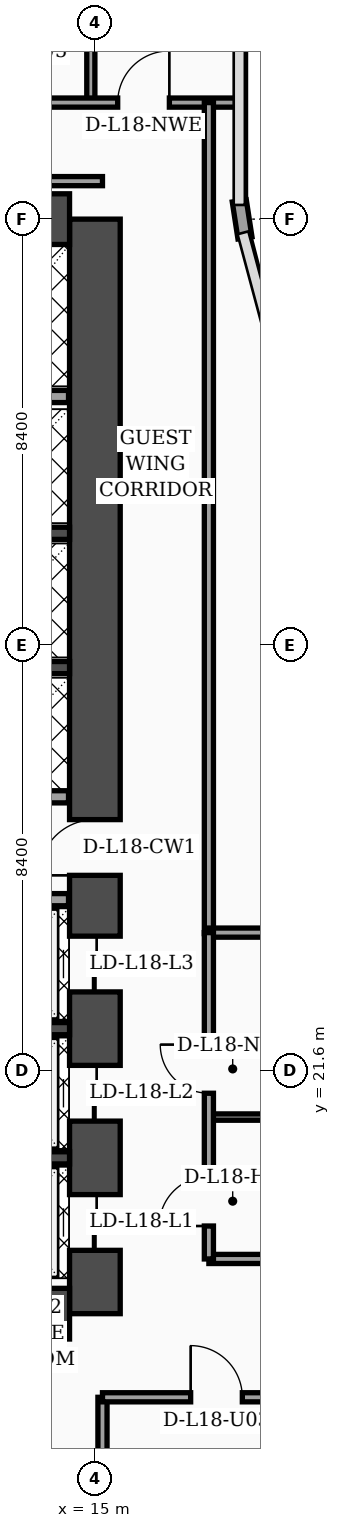
"""IFC4 building model, lengths in metres.
Left out: names, types, materials, properties, quantities, classifications, styles, units other than length and angle.
Written with IfcOpenShell. Run it as: python <this file> out.ifc"""

import sys

from ifc_helpers import new_model, si_unit, direction, frame, frame_2d, origin, place, context, subcontext, project, spatial, rectangle, extrude, element, fill, save


model = new_model("IFC4")
c1 = context("Model", 3, precision=1e-05, world=origin(), true_north=direction((0.0, 1.0)))
c2 = subcontext(c1, "Body", "Model", "MODEL_VIEW")
j1 = project(units=[si_unit("LENGTHUNIT", "METRE"), si_unit("PLANEANGLEUNIT", "RADIAN")], contexts=[c1])
p1 = place(None, origin())
s1 = spatial("IfcSite", under=j1, at=p1, CompositionType="ELEMENT")
p2 = place(p1, origin())
s2 = spatial("IfcBuilding", under=s1, at=p2, CompositionType="ELEMENT")
p3 = place(p2, frame((0.0, 0.0, 77.4)))
s3 = spatial("IfcBuildingStorey", under=s2, at=p3, CompositionType="ELEMENT", Elevation=77.4)
p4 = place(p3, frame((15.0, 16.8, 0.0), z_axis=(0.0, 0.0, 1.0), x_axis=(0.0, 1.0, 0.0)))
e1 = element("IfcWall", 1, at=p4, inside=s3, PredefinedType="SHEAR", context=c2, shape_type="SweptSolid", body=[
    extrude(rectangle(XDim=21.6, YDim=1.0, at=frame_2d((10.8, 0.0))), origin(), (0.0, 0.0, 1.0), 3.56),
])
p5 = place(p4, frame((8.65, 0.0, 0.0)))
e2 = element("IfcOpeningElement", 2, at=p5, cuts=e1, PredefinedType="OPENING", context=c2, shape_type="SweptSolid", body=[
    extrude(rectangle(XDim=1.1, YDim=2.2, at=frame_2d((0.55, 1.1))), frame((0.0, 0.51, 0.0), z_axis=(0.0, -1.0, 0.0), x_axis=(1.0, 0.0, 0.0)), (0.0, 0.0, 1.0), 1.02),
])
p6 = place(p4, frame((1.25, 0.0, 0.0)))
e3 = element("IfcOpeningElement", 3, at=p6, cuts=e1, PredefinedType="OPENING", context=c2, shape_type="SweptSolid", body=[
    extrude(rectangle(XDim=1.1, YDim=2.2, at=frame_2d((0.55, 1.1))), frame((0.0, 0.51, 0.0), z_axis=(0.0, -1.0, 0.0), x_axis=(1.0, 0.0, 0.0)), (0.0, 0.0, 1.0), 1.02),
])
p7 = place(p4, frame((3.8, 0.0, 0.0)))
e4 = element("IfcOpeningElement", 4, at=p7, cuts=e1, PredefinedType="OPENING", context=c2, shape_type="SweptSolid", body=[
    extrude(rectangle(XDim=1.1, YDim=2.2, at=frame_2d((0.55, 1.1))), frame((0.0, 0.51, 0.0), z_axis=(0.0, -1.0, 0.0), x_axis=(1.0, 0.0, 0.0)), (0.0, 0.0, 1.0), 1.02),
])
p8 = place(p4, frame((6.35, 0.0, 0.0)))
e5 = element("IfcOpeningElement", 5, at=p8, cuts=e1, PredefinedType="OPENING", context=c2, shape_type="SweptSolid", body=[
    extrude(rectangle(XDim=1.1, YDim=2.2, at=frame_2d((0.55, 1.1))), frame((0.0, 0.51, 0.0), z_axis=(0.0, -1.0, 0.0), x_axis=(1.0, 0.0, 0.0)), (0.0, 0.0, 1.0), 1.02),
])
for number, where, z_axis, x_axis in (
    (6, (4.7, 38.4, 0.0), (0.0, 0.0, 1.0), (1.0, 0.0, 0.0)),
    (7, (4.7, 16.8, 0.0), (0.0, 0.0, 1.0), (1.0, 0.0, 0.0)),
):
    element("IfcWall", number, at=place(p3, frame(where, z_axis=z_axis, x_axis=x_axis)), inside=s3, PredefinedType="SHEAR", context=c2, shape_type="SweptSolid", body=[
        extrude(rectangle(XDim=9.8, YDim=1.0, at=frame_2d((4.9, 0.0))), origin(), (0.0, 0.0, 1.0), 3.56),
    ])
for number, where, z_axis, x_axis in (
    (8, (12.18, 19.875, 0.0), (0.0, 0.0, 1.0), (1.0, 0.0, 0.0)),
    (9, (12.18, 22.425, 0.0), (0.0, 0.0, 1.0), (1.0, 0.0, 0.0)),
    (10, (12.18, 29.55, 0.0), (0.0, 0.0, 1.0), (1.0, 0.0, 0.0)),
    (11, (12.18, 32.2, 0.0), (0.0, 0.0, 1.0), (1.0, 0.0, 0.0)),
):
    element("IfcWall", number, at=place(p3, frame(where, z_axis=z_axis, x_axis=x_axis)), inside=s3, PredefinedType="SOLIDWALL", context=c2, shape_type="SweptSolid", body=[
        extrude(rectangle(XDim=2.32, YDim=0.24, at=frame_2d((1.16, 0.0))), origin(), (0.0, 0.0, 1.0), 3.56),
    ])
p9 = place(p3, frame((17.962, 38.03, 0.0), z_axis=(0.0, 0.0, 1.0), x_axis=(-0.15141125477, 0.988470855377, 0.0)))
e12 = element("IfcWall", 12, at=p9, inside=s3, PredefinedType="SOLIDWALL", context=c2, shape_type="SweptSolid", body=[
    extrude(rectangle(XDim=0.739, YDim=0.28, at=frame_2d((0.369, 0.0))), origin(), (0.0, 0.0, 1.0), 3.56),
])
p10 = place(p3, frame((12.15, 24.97, 0.0), z_axis=(0.0, 0.0, 1.0), x_axis=(1.0, 0.0, 0.0)))
e13 = element("IfcWall", 13, at=p10, inside=s3, PredefinedType="SOLIDWALL", context=c2, shape_type="SweptSolid", body=[
    extrude(rectangle(XDim=2.33, YDim=0.24, at=frame_2d((1.165, 0.0))), origin(), (0.0, 0.0, 1.0), 2.84),
])
p11 = place(p3, frame((12.25, 27.0, 0.0), z_axis=(0.0, 0.0, 1.0), x_axis=(1.0, 0.0, 0.0)))
e14 = element("IfcWall", 14, at=p11, inside=s3, PredefinedType="SOLIDWALL", context=c2, shape_type="SweptSolid", body=[
    extrude(rectangle(XDim=2.23, YDim=0.24, at=frame_2d((1.115, 0.0))), origin(), (0.0, 0.0, 1.0), 3.56),
])
p12 = place(p3, frame((9.66, 34.9, 0.0), z_axis=(0.0, 0.0, 1.0), x_axis=(1.0, 0.0, 0.0)))
e15 = element("IfcWall", 15, at=p12, inside=s3, PredefinedType="SOLIDWALL", context=c2, shape_type="SweptSolid", body=[
    extrude(rectangle(XDim=4.82, YDim=0.24, at=frame_2d((2.41, 0.0))), origin(), (0.0, 0.0, 1.0), 3.56),
])
p13 = place(p3, frame((15.15, 2.44, 0.0), z_axis=(0.0, 0.0, 1.0), x_axis=(0.0, 1.0, 0.0)))
e16 = element("IfcWall", 16, at=p13, inside=s3, PredefinedType="PARTITIONING", context=c2, shape_type="SweptSolid", body=[
    extrude(rectangle(XDim=12.71, YDim=0.18, at=frame_2d((6.355, 0.0))), origin(), (0.0, 0.0, 1.0), 3.04),
])
p14 = place(p3, frame((15.15, 15.15, 0.0), z_axis=(0.0, 0.0, 1.0), x_axis=(1.0, 0.0, 0.0)))
e17 = element("IfcWall", 17, at=p14, inside=s3, PredefinedType="PARTITIONING", context=c2, shape_type="SweptSolid", body=[
    extrude(rectangle(XDim=6.45, YDim=0.18, at=frame_2d((3.225, 0.0))), origin(), (0.0, 0.0, 1.0), 2.34),
])
p15 = place(p14, frame((1.74, 0.0, 0.0)))
e18 = element("IfcOpeningElement", 18, at=p15, cuts=e17, PredefinedType="OPENING", context=c2, shape_type="SweptSolid", body=[
    extrude(rectangle(XDim=1.02, YDim=2.2, at=frame_2d((0.51, 1.1))), frame((0.0, 0.1, 0.0), z_axis=(0.0, -1.0, 0.0), x_axis=(1.0, 0.0, 0.0)), (0.0, 0.0, 1.0), 0.2),
])
p16 = place(p3, frame((14.92, 40.7, 0.0), z_axis=(0.0, 0.0, 1.0), x_axis=(0.0, 1.0, 0.0)))
e19 = element("IfcWall", 19, at=p16, inside=s3, PredefinedType="PARTITIONING", context=c2, shape_type="SweptSolid", body=[
    extrude(rectangle(XDim=7.1, YDim=0.16, at=frame_2d((3.55, 0.0))), origin(), (0.0, 0.0, 1.0), 3.04),
])
p17 = place(p3, frame((0.08, 40.7, 0.0), z_axis=(0.0, 0.0, 1.0), x_axis=(1.0, 0.0, 0.0)))
e20 = element("IfcWall", 20, at=p17, inside=s3, PredefinedType="PARTITIONING", context=c2, shape_type="SweptSolid", body=[
    extrude(rectangle(XDim=17.77, YDim=0.18, at=frame_2d((8.885, 0.0))), origin(), (0.0, 0.0, 1.0), 2.84),
])
p18 = place(p17, frame((0.9, 0.0, 0.0)))
e21 = element("IfcOpeningElement", 21, at=p18, cuts=e20, PredefinedType="OPENING", context=c2, shape_type="SweptSolid", body=[
    extrude(rectangle(XDim=1.02, YDim=2.2, at=frame_2d((0.51, 1.1))), frame((0.0, 0.1, 0.0), z_axis=(0.0, -1.0, 0.0), x_axis=(1.0, 0.0, 0.0)), (0.0, 0.0, 1.0), 0.2),
])
p19 = place(p17, frame((4.04, 0.0, 0.0)))
e22 = element("IfcOpeningElement", 22, at=p19, cuts=e20, PredefinedType="OPENING", context=c2, shape_type="SweptSolid", body=[
    extrude(rectangle(XDim=1.02, YDim=2.2, at=frame_2d((0.51, 1.1))), frame((0.0, 0.1, 0.0), z_axis=(0.0, -1.0, 0.0), x_axis=(1.0, 0.0, 0.0)), (0.0, 0.0, 1.0), 0.2),
])
p20 = place(p17, frame((9.92, 0.0, 0.0)))
e23 = element("IfcOpeningElement", 23, at=p20, cuts=e20, PredefinedType="OPENING", context=c2, shape_type="SweptSolid", body=[
    extrude(rectangle(XDim=1.02, YDim=2.2, at=frame_2d((0.51, 1.1))), frame((0.0, 0.1, 0.0), z_axis=(0.0, -1.0, 0.0), x_axis=(1.0, 0.0, 0.0)), (0.0, 0.0, 1.0), 0.2),
])
p21 = place(p17, frame((15.37, 0.0, 0.0)))
e24 = element("IfcOpeningElement", 24, at=p21, cuts=e20, PredefinedType="OPENING", context=c2, shape_type="SweptSolid", body=[
    extrude(rectangle(XDim=1.02, YDim=2.2, at=frame_2d((0.51, 1.1))), frame((0.0, 0.1, 0.0), z_axis=(0.0, -1.0, 0.0), x_axis=(1.0, 0.0, 0.0)), (0.0, 0.0, 1.0), 0.2),
])
p22 = place(p3, frame((17.25, 24.3, 0.0), z_axis=(0.0, 0.0, 1.0), x_axis=(0.0, 1.0, 0.0)))
e25 = element("IfcWall", 25, at=p22, inside=s3, PredefinedType="PARTITIONING", context=c2, shape_type="SweptSolid", body=[
    extrude(rectangle(XDim=16.4, YDim=0.18, at=frame_2d((8.2, 0.0))), origin(), (0.0, 0.0, 1.0), 2.84),
])
p23 = place(p3, frame((3.68, 39.15, 0.0), z_axis=(0.0, 0.0, 1.0), x_axis=(1.0, 0.0, 0.0)))
e26 = element("IfcWall", 26, at=p23, inside=s3, PredefinedType="PARTITIONING", context=c2, shape_type="SweptSolid", body=[
    extrude(rectangle(XDim=11.47, YDim=0.18, at=frame_2d((5.735, 0.0))), origin(), (0.0, 0.0, 1.0), 2.84),
])
p24 = place(p3, frame((17.25, 17.88, 0.0), z_axis=(0.0, 0.0, 1.0), x_axis=(1.0, 0.0, 0.0)))
e27 = element("IfcWall", 27, at=p24, inside=s3, PredefinedType="PARTITIONING", context=c2, shape_type="SweptSolid", body=[
    extrude(rectangle(XDim=4.3, YDim=0.18, at=frame_2d((2.15, 0.0))), origin(), (0.0, 0.0, 1.0), 3.09),
])
p25 = place(p3, frame((17.25, 20.68, 0.0), z_axis=(0.0, 0.0, 1.0), x_axis=(1.0, 0.0, 0.0)))
e28 = element("IfcWall", 28, at=p25, inside=s3, PredefinedType="PARTITIONING", context=c2, shape_type="SweptSolid", body=[
    extrude(rectangle(XDim=4.3, YDim=0.125, at=frame_2d((2.15, 0.0))), origin(), (0.0, 0.0, 1.0), 3.56),
])
p26 = place(p3, frame((17.25, 24.32, 0.0), z_axis=(0.0, 0.0, 1.0), x_axis=(1.0, 0.0, 0.0)))
e29 = element("IfcWall", 29, at=p26, inside=s3, PredefinedType="PARTITIONING", context=c2, shape_type="SweptSolid", body=[
    extrude(rectangle(XDim=4.35, YDim=0.18, at=frame_2d((2.175, 0.0))), origin(), (0.0, 0.0, 1.0), 3.56),
])
p27 = place(p3, frame((17.25, 17.88, 0.0), z_axis=(0.0, 0.0, 1.0), x_axis=(0.0, 1.0, 0.0)))
e30 = element("IfcWall", 30, at=p27, inside=s3, PredefinedType="PARTITIONING", context=c2, shape_type="SweptSolid", body=[
    extrude(rectangle(XDim=6.44, YDim=0.18, at=frame_2d((3.22, 0.0))), origin(), (0.0, 0.0, 1.0), 3.09),
])
p28 = place(p27, frame((0.65, 0.0, 0.0)))
e31 = element("IfcOpeningElement", 31, at=p28, cuts=e30, PredefinedType="OPENING", context=c2, shape_type="SweptSolid", body=[
    extrude(rectangle(XDim=0.98, YDim=2.15, at=frame_2d((0.49, 1.075))), frame((0.0, 0.1, 0.0), z_axis=(0.0, -1.0, 0.0), x_axis=(1.0, 0.0, 0.0)), (0.0, 0.0, 1.0), 0.2),
])
p29 = place(p27, frame((3.27, 0.0, 0.0)))
e32 = element("IfcOpeningElement", 32, at=p29, cuts=e30, PredefinedType="OPENING", context=c2, shape_type="SweptSolid", body=[
    extrude(rectangle(XDim=0.96, YDim=2.2, at=frame_2d((0.48, 1.1))), frame((0.0, 0.1, 0.0), z_axis=(0.0, -1.0, 0.0), x_axis=(1.0, 0.0, 0.0)), (0.0, 0.0, 1.0), 0.2),
])
p30 = place(p15, origin())
e33 = element("IfcDoor", 33, at=p30, inside=s3, OperationType="SINGLE_SWING_LEFT", PredefinedType="DOOR", context=c2, shape_type="SweptSolid", body=[
    extrude(rectangle(XDim=1.02, YDim=2.2, at=frame_2d((0.51, 1.1))), frame((0.0, 0.025, 0.0), z_axis=(0.0, -1.0, 0.0), x_axis=(1.0, 0.0, 0.0)), (0.0, 0.0, 1.0), 0.05),
])
fill(e18, e33)
p31 = place(p21, origin())
e34 = element("IfcDoor", 34, at=p31, inside=s3, OperationType="SINGLE_SWING_RIGHT", PredefinedType="DOOR", context=c2, shape_type="SweptSolid", body=[
    extrude(rectangle(XDim=1.02, YDim=2.2, at=frame_2d((0.51, 1.1))), frame((0.0, 0.025, 0.0), z_axis=(0.0, -1.0, 0.0), x_axis=(1.0, 0.0, 0.0)), (0.0, 0.0, 1.0), 0.05),
])
fill(e24, e34)
p32 = place(p28, origin())
e35 = element("IfcDoor", 35, at=p32, inside=s3, OperationType="SINGLE_SWING_LEFT", PredefinedType="DOOR", context=c2, shape_type="SweptSolid", body=[
    extrude(rectangle(XDim=0.98, YDim=2.15, at=frame_2d((0.49, 1.075))), frame((0.0, 0.025, 0.0), z_axis=(0.0, -1.0, 0.0), x_axis=(1.0, 0.0, 0.0)), (0.0, 0.0, 1.0), 0.05),
])
fill(e31, e35)
p33 = place(p29, origin())
e36 = element("IfcDoor", 36, at=p33, inside=s3, OperationType="SINGLE_SWING_RIGHT", PredefinedType="DOOR", context=c2, shape_type="SweptSolid", body=[
    extrude(rectangle(XDim=0.96, YDim=2.2, at=frame_2d((0.48, 1.1))), frame((0.0, 0.025, 0.0), z_axis=(0.0, -1.0, 0.0), x_axis=(1.0, 0.0, 0.0)), (0.0, 0.0, 1.0), 0.05),
])
fill(e32, e36)
p34 = place(p5, origin())
e37 = element("IfcDoor", 37, at=p34, inside=s3, OperationType="SINGLE_SWING_LEFT", PredefinedType="DOOR", context=c2, shape_type="SweptSolid", body=[
    extrude(rectangle(XDim=1.1, YDim=2.2, at=frame_2d((0.55, 1.1))), frame((0.0, 0.025, 0.0), z_axis=(0.0, -1.0, 0.0), x_axis=(1.0, 0.0, 0.0)), (0.0, 0.0, 1.0), 0.05),
])
fill(e2, e37)
p35 = place(p6, origin())
e38 = element("IfcDoor", 38, at=p35, inside=s3, OperationType="DOUBLE_DOOR_SLIDING", PredefinedType="DOOR", context=c2, shape_type="SweptSolid", body=[
    extrude(rectangle(XDim=1.1, YDim=2.2, at=frame_2d((0.55, 1.1))), frame((0.0, 0.025, 0.0), z_axis=(0.0, -1.0, 0.0), x_axis=(1.0, 0.0, 0.0)), (0.0, 0.0, 1.0), 0.05),
])
fill(e3, e38)
p36 = place(p7, origin())
e39 = element("IfcDoor", 39, at=p36, inside=s3, OperationType="DOUBLE_DOOR_SLIDING", PredefinedType="DOOR", context=c2, shape_type="SweptSolid", body=[
    extrude(rectangle(XDim=1.1, YDim=2.2, at=frame_2d((0.55, 1.1))), frame((0.0, 0.025, 0.0), z_axis=(0.0, -1.0, 0.0), x_axis=(1.0, 0.0, 0.0)), (0.0, 0.0, 1.0), 0.05),
])
fill(e4, e39)
p37 = place(p8, origin())
e40 = element("IfcDoor", 40, at=p37, inside=s3, OperationType="DOUBLE_DOOR_SLIDING", PredefinedType="DOOR", context=c2, shape_type="SweptSolid", body=[
    extrude(rectangle(XDim=1.1, YDim=2.2, at=frame_2d((0.55, 1.1))), frame((0.0, 0.025, 0.0), z_axis=(0.0, -1.0, 0.0), x_axis=(1.0, 0.0, 0.0)), (0.0, 0.0, 1.0), 0.05),
])
fill(e5, e40)
save(model, sys.argv[1])
